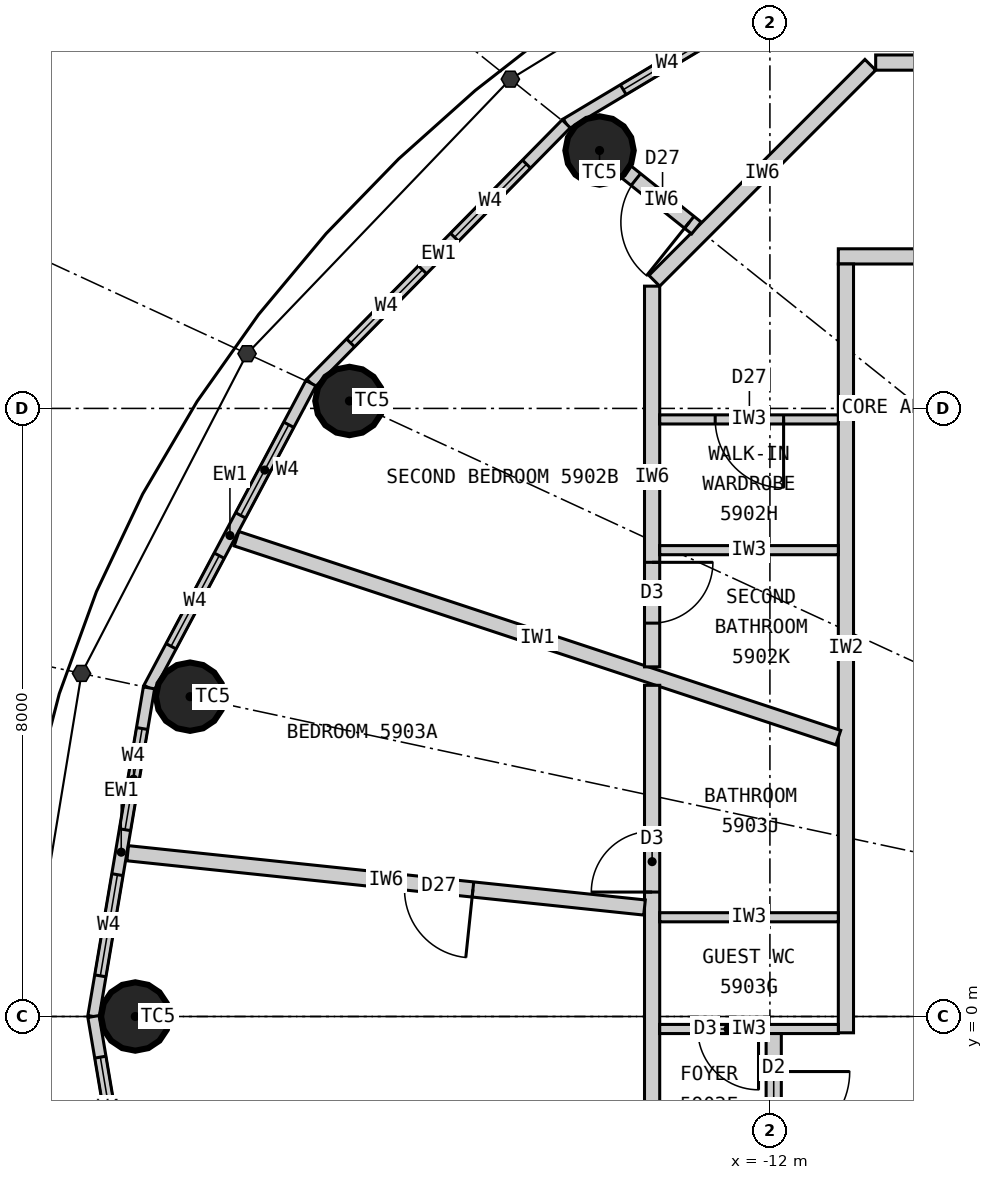
"""IFC4 building model, lengths in metres.
Left out: names, types, materials, properties, quantities, classifications, styles, units other than length and angle.
Written with IfcOpenShell. Run it as: python <this file> out.ifc"""

import sys

from ifc_helpers import new_model, si_unit, direction, frame, frame_2d, origin, origin_2d, place, context, subcontext, project, spatial, rectangle, circle, extrude, element, fill, save


model = new_model("IFC4")
c1 = context("Model", 3, precision=1e-05, world=origin(), true_north=direction((0.0, 1.0)))
c2 = subcontext(c1, "Body", "Model", "MODEL_VIEW")
j1 = project(units=[si_unit("LENGTHUNIT", "METRE"), si_unit("PLANEANGLEUNIT", "RADIAN")], contexts=[c1])
p1 = place(None, origin())
s1 = spatial("IfcSite", under=j1, at=p1, CompositionType="ELEMENT")
p2 = place(p1, origin())
s2 = spatial("IfcBuilding", under=s1, at=p2, CompositionType="ELEMENT")
p3 = place(p2, frame((0.0, 0.0, 219.3)))
s3 = spatial("IfcBuildingStorey", under=s2, at=p3, CompositionType="ELEMENT", Elevation=219.3)
for number, where, z_axis, x_axis in (
    (1, (-14.241, 11.393, 0.0), (0.0, 0.0, 1.0), (1.0, 0.0, 0.0)),
    (2, (-17.532, 8.098, 0.0), (0.0, 0.0, 1.0), (1.0, 0.0, 0.0)),
    (3, (-19.629, 4.208, 0.0), (0.0, 0.0, 1.0), (1.0, 0.0, 0.0)),
    (4, (-20.35, 0.0, 0.0), (0.0, 0.0, 1.0), (1.0, 0.0, 0.0)),
):
    element("IfcColumn", number, at=place(p3, frame(where, z_axis=z_axis, x_axis=x_axis)), inside=s3, PredefinedType="COLUMN", context=c2, shape_type="SweptSolid", body=[
        extrude(circle(Radius=0.45, at=origin_2d()), origin(), (0.0, 0.0, 1.0), 3.3),
    ])
p4 = place(p3, frame((-10.346, 14.336, 0.0), z_axis=(0.0, 0.0, 1.0), x_axis=(-0.85822150553, -0.513279502265, 0.0)))
e5 = element("IfcWall", 5, at=p4, inside=s3, PredefinedType="ELEMENTEDWALL", context=c2, shape_type="SweptSolid", body=[
    extrude(rectangle(XDim=5.05, YDim=0.15, at=frame_2d((2.525, 0.0))), origin(), (0.0, 0.0, 1.0), 3.12),
])
p5 = place(p4, frame((0.875, 0.0, 0.9)))
e6 = element("IfcOpeningElement", 6, at=p5, cuts=e5, PredefinedType="OPENING", context=c2, shape_type="SweptSolid", body=[
    extrude(rectangle(XDim=1.35, YDim=1.9, at=frame_2d((0.675, 0.95))), frame((0.0, 0.085, 0.0), z_axis=(0.0, -1.0, 0.0), x_axis=(1.0, 0.0, 0.0)), (0.0, 0.0, 1.0), 0.17),
])
p6 = place(p4, frame((2.825, 0.0, 0.9)))
e7 = element("IfcOpeningElement", 7, at=p6, cuts=e5, PredefinedType="OPENING", context=c2, shape_type="SweptSolid", body=[
    extrude(rectangle(XDim=1.35, YDim=1.9, at=frame_2d((0.675, 0.95))), frame((0.0, 0.085, 0.0), z_axis=(0.0, -1.0, 0.0), x_axis=(1.0, 0.0, 0.0)), (0.0, 0.0, 1.0), 0.17),
])
p7 = place(p3, frame((-14.68, 11.744, 0.0), z_axis=(0.0, 0.0, 1.0), x_axis=(-0.701527379618, -0.712642501993, 0.0)))
e8 = element("IfcWall", 8, at=p7, inside=s3, PredefinedType="ELEMENTEDWALL", context=c2, shape_type="SweptSolid", body=[
    extrude(rectangle(XDim=4.788, YDim=0.15, at=frame_2d((2.394, 0.0))), origin(), (0.0, 0.0, 1.0), 3.12),
])
p8 = place(p7, frame((0.744, 0.0, 0.9)))
e9 = element("IfcOpeningElement", 9, at=p8, cuts=e8, PredefinedType="OPENING", context=c2, shape_type="SweptSolid", body=[
    extrude(rectangle(XDim=1.35, YDim=1.9, at=frame_2d((0.675, 0.95))), frame((0.0, 0.085, 0.0), z_axis=(0.0, -1.0, 0.0), x_axis=(1.0, 0.0, 0.0)), (0.0, 0.0, 1.0), 0.17),
])
p9 = place(p7, frame((2.694, 0.0, 0.9)))
e10 = element("IfcOpeningElement", 10, at=p9, cuts=e8, PredefinedType="OPENING", context=c2, shape_type="SweptSolid", body=[
    extrude(rectangle(XDim=1.35, YDim=1.9, at=frame_2d((0.675, 0.95))), frame((0.0, 0.085, 0.0), z_axis=(0.0, -1.0, 0.0), x_axis=(1.0, 0.0, 0.0)), (0.0, 0.0, 1.0), 0.17),
])
p10 = place(p3, frame((-18.04, 8.332, 0.0), z_axis=(0.0, 0.0, 1.0), x_axis=(-0.469256152955, -0.883062094597, 0.0)))
e11 = element("IfcWall", 11, at=p10, inside=s3, PredefinedType="ELEMENTEDWALL", context=c2, shape_type="SweptSolid", body=[
    extrude(rectangle(XDim=4.539, YDim=0.15, at=frame_2d((2.27, 0.0))), origin(), (0.0, 0.0, 1.0), 3.12),
])
p11 = place(p10, frame((0.62, 0.0, 0.9)))
e12 = element("IfcOpeningElement", 12, at=p11, cuts=e11, PredefinedType="OPENING", context=c2, shape_type="SweptSolid", body=[
    extrude(rectangle(XDim=1.35, YDim=1.9, at=frame_2d((0.675, 0.95))), frame((0.0, 0.085, 0.0), z_axis=(0.0, -1.0, 0.0), x_axis=(1.0, 0.0, 0.0)), (0.0, 0.0, 1.0), 0.17),
])
p12 = place(p10, frame((2.57, 0.0, 0.9)))
e13 = element("IfcOpeningElement", 13, at=p12, cuts=e11, PredefinedType="OPENING", context=c2, shape_type="SweptSolid", body=[
    extrude(rectangle(XDim=1.35, YDim=1.9, at=frame_2d((0.675, 0.95))), frame((0.0, 0.085, 0.0), z_axis=(0.0, -1.0, 0.0), x_axis=(1.0, 0.0, 0.0)), (0.0, 0.0, 1.0), 0.17),
])
p13 = place(p3, frame((-20.17, 4.323, 0.0), z_axis=(0.0, 0.0, 1.0), x_axis=(-0.166538513568, -0.986034950445, 0.0)))
e14 = element("IfcWall", 14, at=p13, inside=s3, PredefinedType="ELEMENTEDWALL", context=c2, shape_type="SweptSolid", body=[
    extrude(rectangle(XDim=4.385, YDim=0.15, at=frame_2d((2.192, 0.0))), origin(), (0.0, 0.0, 1.0), 3.12),
])
p14 = place(p13, frame((0.542, 0.0, 0.9)))
e15 = element("IfcOpeningElement", 15, at=p14, cuts=e14, PredefinedType="OPENING", context=c2, shape_type="SweptSolid", body=[
    extrude(rectangle(XDim=1.35, YDim=1.9, at=frame_2d((0.675, 0.95))), frame((0.0, 0.085, 0.0), z_axis=(0.0, -1.0, 0.0), x_axis=(1.0, 0.0, 0.0)), (0.0, 0.0, 1.0), 0.17),
])
p15 = place(p13, frame((2.492, 0.0, 0.9)))
e16 = element("IfcOpeningElement", 16, at=p15, cuts=e14, PredefinedType="OPENING", context=c2, shape_type="SweptSolid", body=[
    extrude(rectangle(XDim=1.35, YDim=1.9, at=frame_2d((0.675, 0.95))), frame((0.0, 0.085, 0.0), z_axis=(0.0, -1.0, 0.0), x_axis=(1.0, 0.0, 0.0)), (0.0, 0.0, 1.0), 0.17),
])
p16 = place(p3, frame((-20.9, 0.0, 0.0), z_axis=(0.0, 0.0, 1.0), x_axis=(0.166538513568, -0.986034950445, 0.0)))
e17 = element("IfcWall", 17, at=p16, inside=s3, PredefinedType="ELEMENTEDWALL", context=c2, shape_type="SweptSolid", body=[
    extrude(rectangle(XDim=4.385, YDim=0.15, at=frame_2d((2.192, 0.0))), origin(), (0.0, 0.0, 1.0), 3.12),
])
p17 = place(p16, frame((0.542, 0.0, 0.9)))
e18 = element("IfcOpeningElement", 18, at=p17, cuts=e17, PredefinedType="OPENING", context=c2, shape_type="SweptSolid", body=[
    extrude(rectangle(XDim=1.35, YDim=1.9, at=frame_2d((0.675, 0.95))), frame((0.0, 0.085, 0.0), z_axis=(0.0, -1.0, 0.0), x_axis=(1.0, 0.0, 0.0)), (0.0, 0.0, 1.0), 0.17),
])
p18 = place(p16, frame((2.492, 0.0, 0.9)))
e19 = element("IfcOpeningElement", 19, at=p18, cuts=e17, PredefinedType="OPENING", context=c2, shape_type="SweptSolid", body=[
    extrude(rectangle(XDim=1.35, YDim=1.9, at=frame_2d((0.675, 0.95))), frame((0.0, 0.085, 0.0), z_axis=(0.0, -1.0, 0.0), x_axis=(1.0, 0.0, 0.0)), (0.0, 0.0, 1.0), 0.17),
])
p19 = place(p3, frame((-11.1, 10.0, 0.0), z_axis=(0.0, 0.0, 1.0), x_axis=(1.0, 0.0, 0.0)))
e20 = element("IfcWall", 20, at=p19, inside=s3, PredefinedType="PARTITIONING", context=c2, shape_type="SweptSolid", body=[
    extrude(rectangle(XDim=22.2, YDim=0.2, at=frame_2d((11.1, 0.0))), origin(), (0.0, 0.0, 1.0), 3.12),
])
p20 = place(p19, frame((20.9, 0.0, 0.0)))
e21 = element("IfcOpeningElement", 21, at=p20, cuts=e20, PredefinedType="OPENING", context=c2, shape_type="SweptSolid", body=[
    extrude(rectangle(XDim=1.0, YDim=2.2, at=frame_2d((0.5, 1.1))), frame((0.0, 0.11, 0.0), z_axis=(0.0, -1.0, 0.0), x_axis=(1.0, 0.0, 0.0)), (0.0, 0.0, 1.0), 0.22),
])
p21 = place(p19, frame((2.82, 0.0, 0.0)))
e22 = element("IfcOpeningElement", 22, at=p21, cuts=e20, PredefinedType="OPENING", context=c2, shape_type="SweptSolid", body=[
    extrude(rectangle(XDim=1.0, YDim=2.2, at=frame_2d((0.5, 1.1))), frame((0.0, 0.11, 0.0), z_axis=(0.0, -1.0, 0.0), x_axis=(1.0, 0.0, 0.0)), (0.0, 0.0, 1.0), 0.22),
])
p22 = place(p3, frame((-11.0, 9.9, 0.0), z_axis=(0.0, 0.0, 1.0), x_axis=(0.0, -1.0, 0.0)))
e23 = element("IfcWall", 23, at=p22, inside=s3, PredefinedType="PARTITIONING", context=c2, shape_type="SweptSolid", body=[
    extrude(rectangle(XDim=10.114, YDim=0.2, at=frame_2d((5.057, 0.0))), origin(), (0.0, 0.0, 1.0), 3.12),
])
p23 = place(p3, frame((-11.1, 3.669, 0.0), z_axis=(0.0, 0.0, 1.0), x_axis=(-0.949476668397, 0.313837627079, 0.0)))
e24 = element("IfcWall", 24, at=p23, inside=s3, PredefinedType="PARTITIONING", context=c2, shape_type="SweptSolid", body=[
    extrude(rectangle(XDim=8.339, YDim=0.2, at=frame_2d((4.169, 0.0))), origin(), (0.0, 0.0, 1.0), 3.12),
])
p24 = place(p3, frame((1.968, 12.55, 0.0), z_axis=(0.0, 0.0, 1.0), x_axis=(-1.0, 0.0, 0.0)))
e25 = element("IfcWall", 25, at=p24, inside=s3, PredefinedType="PARTITIONING", context=c2, shape_type="SweptSolid", body=[
    extrude(rectangle(XDim=12.576, YDim=0.2, at=frame_2d((6.288, 0.0))), origin(), (0.0, 0.0, 1.0), 3.12),
])
p25 = place(p24, frame((1.708, 0.0, 0.0)))
e26 = element("IfcOpeningElement", 26, at=p25, cuts=e25, PredefinedType="OPENING", context=c2, shape_type="SweptSolid", body=[
    extrude(rectangle(XDim=0.8, YDim=2.1, at=frame_2d((0.4, 1.05))), frame((0.0, 0.11, 0.0), z_axis=(0.0, -1.0, 0.0), x_axis=(1.0, 0.0, 0.0)), (0.0, 0.0, 1.0), 0.22),
])
p26 = place(p24, frame((6.62, 0.0, 0.0)))
e27 = element("IfcOpeningElement", 27, at=p26, cuts=e25, PredefinedType="OPENING", context=c2, shape_type="SweptSolid", body=[
    extrude(rectangle(XDim=0.9, YDim=2.1, at=frame_2d((0.45, 1.05))), frame((0.0, 0.11, 0.0), z_axis=(0.0, -1.0, 0.0), x_axis=(1.0, 0.0, 0.0)), (0.0, 0.0, 1.0), 0.22),
])
p27 = place(p3, frame((-10.679, 12.521, 0.0), z_axis=(0.0, 0.0, 1.0), x_axis=(-0.707106781187, -0.707106781187, 0.0)))
e28 = element("IfcWall", 28, at=p27, inside=s3, PredefinedType="PARTITIONING", context=c2, shape_type="SweptSolid", body=[
    extrude(rectangle(XDim=4.019, YDim=0.2, at=frame_2d((2.009, 0.0))), origin(), (0.0, 0.0, 1.0), 3.12),
])
p28 = place(p3, frame((-13.55, 9.609, 0.0), z_axis=(0.0, 0.0, 1.0), x_axis=(0.0, -1.0, 0.0)))
e29 = element("IfcWall", 29, at=p28, inside=s3, PredefinedType="PARTITIONING", context=c2, shape_type="SweptSolid", body=[
    extrude(rectangle(XDim=5.009, YDim=0.2, at=frame_2d((2.504, 0.0))), origin(), (0.0, 0.0, 1.0), 3.12),
])
p29 = place(p28, frame((3.633, 0.0, 0.0)))
e30 = element("IfcOpeningElement", 30, at=p29, cuts=e29, PredefinedType="OPENING", context=c2, shape_type="SweptSolid", body=[
    extrude(rectangle(XDim=0.8, YDim=2.1, at=frame_2d((0.4, 1.05))), frame((0.0, 0.11, 0.0), z_axis=(0.0, -1.0, 0.0), x_axis=(1.0, 0.0, 0.0)), (0.0, 0.0, 1.0), 0.22),
])
p30 = place(p3, frame((-12.968, 10.374, 0.0), z_axis=(0.0, 0.0, 1.0), x_axis=(-0.780888968944, 0.624669847345, 0.0)))
e31 = element("IfcWall", 31, at=p30, inside=s3, PredefinedType="PARTITIONING", context=c2, shape_type="SweptSolid", body=[
    extrude(rectangle(XDim=1.181, YDim=0.2, at=frame_2d((0.591, 0.0))), origin(), (0.0, 0.0, 1.0), 2.42),
])
p31 = place(p30, frame((0.12, 0.0, 0.0)))
e32 = element("IfcOpeningElement", 32, at=p31, cuts=e31, PredefinedType="OPENING", context=c2, shape_type="SweptSolid", body=[
    extrude(rectangle(XDim=0.9, YDim=2.1, at=frame_2d((0.45, 1.05))), frame((0.0, 0.11, 0.0), z_axis=(0.0, -1.0, 0.0), x_axis=(1.0, 0.0, 0.0)), (0.0, 0.0, 1.0), 0.22),
])
p32 = place(p3, frame((-11.1, 7.855, 0.0), z_axis=(0.0, 0.0, 1.0), x_axis=(-1.0, 0.0, 0.0)))
e33 = element("IfcWall", 33, at=p32, inside=s3, PredefinedType="PARTITIONING", context=c2, shape_type="SweptSolid", body=[
    extrude(rectangle(XDim=2.35, YDim=0.12, at=frame_2d((1.175, 0.0))), origin(), (0.0, 0.0, 1.0), 3.12),
])
p33 = place(p32, frame((0.72, 0.0, 0.0)))
e34 = element("IfcOpeningElement", 34, at=p33, cuts=e33, PredefinedType="OPENING", context=c2, shape_type="SweptSolid", body=[
    extrude(rectangle(XDim=0.9, YDim=2.1, at=frame_2d((0.45, 1.05))), frame((0.0, 0.07, 0.0), z_axis=(0.0, -1.0, 0.0), x_axis=(1.0, 0.0, 0.0)), (0.0, 0.0, 1.0), 0.14),
])
p34 = place(p3, frame((-11.1, 6.135, 0.0), z_axis=(0.0, 0.0, 1.0), x_axis=(-1.0, 0.0, 0.0)))
e35 = element("IfcWall", 35, at=p34, inside=s3, PredefinedType="PARTITIONING", context=c2, shape_type="SweptSolid", body=[
    extrude(rectangle(XDim=2.35, YDim=0.12, at=frame_2d((1.175, 0.0))), origin(), (0.0, 0.0, 1.0), 3.12),
])
p35 = place(p3, frame((-13.55, 4.357, 0.0), z_axis=(0.0, 0.0, 1.0), x_axis=(0.0, -1.0, 0.0)))
e36 = element("IfcWall", 36, at=p35, inside=s3, PredefinedType="PARTITIONING", context=c2, shape_type="SweptSolid", body=[
    extrude(rectangle(XDim=12.496, YDim=0.2, at=frame_2d((6.248, 0.0))), origin(), (0.0, 0.0, 1.0), 3.12),
])
p36 = place(p35, frame((1.92, 0.0, 0.0)))
e37 = element("IfcOpeningElement", 37, at=p36, cuts=e36, PredefinedType="OPENING", context=c2, shape_type="SweptSolid", body=[
    extrude(rectangle(XDim=0.8, YDim=2.1, at=frame_2d((0.4, 1.05))), frame((0.0, 0.11, 0.0), z_axis=(0.0, -1.0, 0.0), x_axis=(1.0, 0.0, 0.0)), (0.0, 0.0, 1.0), 0.22),
])
p37 = place(p35, frame((9.27, 0.0, 0.0)))
e38 = element("IfcOpeningElement", 38, at=p37, cuts=e36, PredefinedType="OPENING", context=c2, shape_type="SweptSolid", body=[
    extrude(rectangle(XDim=0.8, YDim=2.1, at=frame_2d((0.4, 1.05))), frame((0.0, 0.11, 0.0), z_axis=(0.0, -1.0, 0.0), x_axis=(1.0, 0.0, 0.0)), (0.0, 0.0, 1.0), 0.22),
])
p38 = place(p35, frame((5.557, 0.0, 0.0)))
e39 = element("IfcOpeningElement", 39, at=p38, cuts=e36, PredefinedType="OPENING", context=c2, shape_type="SweptSolid", body=[
    extrude(rectangle(XDim=0.9, YDim=2.1, at=frame_2d((0.45, 1.05))), frame((0.0, 0.11, 0.0), z_axis=(0.0, -1.0, 0.0), x_axis=(1.0, 0.0, 0.0)), (0.0, 0.0, 1.0), 0.22),
])
p39 = place(p3, frame((-13.65, 1.434, 0.0), z_axis=(0.0, 0.0, 1.0), x_axis=(-0.994526954268, 0.10448031984, 0.0)))
e40 = element("IfcWall", 40, at=p39, inside=s3, PredefinedType="PARTITIONING", context=c2, shape_type="SweptSolid", body=[
    extrude(rectangle(XDim=6.837, YDim=0.2, at=frame_2d((3.418, 0.0))), origin(), (0.0, 0.0, 1.0), 2.47),
])
p40 = place(p39, frame((2.27, 0.0, 0.0)))
e41 = element("IfcOpeningElement", 41, at=p40, cuts=e40, PredefinedType="OPENING", context=c2, shape_type="SweptSolid", body=[
    extrude(rectangle(XDim=0.9, YDim=2.1, at=frame_2d((0.45, 1.05))), frame((0.0, 0.11, 0.0), z_axis=(0.0, -1.0, 0.0), x_axis=(1.0, 0.0, 0.0)), (0.0, 0.0, 1.0), 0.22),
])
p41 = place(p3, frame((-11.1, 1.306, 0.0), z_axis=(0.0, 0.0, 1.0), x_axis=(-1.0, 0.0, 0.0)))
e42 = element("IfcWall", 42, at=p41, inside=s3, PredefinedType="PARTITIONING", context=c2, shape_type="SweptSolid", body=[
    extrude(rectangle(XDim=2.35, YDim=0.12, at=frame_2d((1.175, 0.0))), origin(), (0.0, 0.0, 1.0), 3.12),
])
p42 = place(p3, frame((-11.1, -0.164, 0.0), z_axis=(0.0, 0.0, 1.0), x_axis=(-1.0, 0.0, 0.0)))
e43 = element("IfcWall", 43, at=p42, inside=s3, PredefinedType="PARTITIONING", context=c2, shape_type="SweptSolid", body=[
    extrude(rectangle(XDim=2.35, YDim=0.12, at=frame_2d((1.175, 0.0))), origin(), (0.0, 0.0, 1.0), 3.12),
])
p43 = place(p42, frame((1.05, 0.0, 0.0)))
e44 = element("IfcOpeningElement", 44, at=p43, cuts=e43, PredefinedType="OPENING", context=c2, shape_type="SweptSolid", body=[
    extrude(rectangle(XDim=0.8, YDim=2.1, at=frame_2d((0.4, 1.05))), frame((0.0, 0.07, 0.0), z_axis=(0.0, -1.0, 0.0), x_axis=(1.0, 0.0, 0.0)), (0.0, 0.0, 1.0), 0.14),
])
p44 = place(p3, frame((-11.95, -0.224, 0.0), z_axis=(0.0, 0.0, 1.0), x_axis=(0.0, -1.0, 0.0)))
e45 = element("IfcWall", 45, at=p44, inside=s3, PredefinedType="PARTITIONING", context=c2, shape_type="SweptSolid", body=[
    extrude(rectangle(XDim=2.0, YDim=0.2, at=frame_2d((1.0, 0.0))), origin(), (0.0, 0.0, 1.0), 3.12),
])
p45 = place(p44, frame((0.5, 0.0, 0.0)))
e46 = element("IfcOpeningElement", 46, at=p45, cuts=e45, PredefinedType="OPENING", context=c2, shape_type="SweptSolid", body=[
    extrude(rectangle(XDim=1.0, YDim=2.2, at=frame_2d((0.5, 1.1))), frame((0.0, 0.11, 0.0), z_axis=(0.0, -1.0, 0.0), x_axis=(1.0, 0.0, 0.0)), (0.0, 0.0, 1.0), 0.22),
])
p46 = place(p6, origin())
e47 = element("IfcWindow", 47, at=p46, inside=s3, PartitioningType="SINGLE_PANEL", PredefinedType="WINDOW", context=c2, shape_type="SweptSolid", body=[
    extrude(rectangle(XDim=1.35, YDim=1.9, at=frame_2d((0.675, 0.95))), frame((0.0, 0.03, 0.0), z_axis=(0.0, -1.0, 0.0), x_axis=(1.0, 0.0, 0.0)), (0.0, 0.0, 1.0), 0.06),
])
fill(e7, e47)
p47 = place(p8, origin())
e48 = element("IfcWindow", 48, at=p47, inside=s3, PartitioningType="SINGLE_PANEL", PredefinedType="WINDOW", context=c2, shape_type="SweptSolid", body=[
    extrude(rectangle(XDim=1.35, YDim=1.9, at=frame_2d((0.675, 0.95))), frame((0.0, 0.03, 0.0), z_axis=(0.0, -1.0, 0.0), x_axis=(1.0, 0.0, 0.0)), (0.0, 0.0, 1.0), 0.06),
])
fill(e9, e48)
p48 = place(p9, origin())
e49 = element("IfcWindow", 49, at=p48, inside=s3, PartitioningType="SINGLE_PANEL", PredefinedType="WINDOW", context=c2, shape_type="SweptSolid", body=[
    extrude(rectangle(XDim=1.35, YDim=1.9, at=frame_2d((0.675, 0.95))), frame((0.0, 0.03, 0.0), z_axis=(0.0, -1.0, 0.0), x_axis=(1.0, 0.0, 0.0)), (0.0, 0.0, 1.0), 0.06),
])
fill(e10, e49)
p49 = place(p11, origin())
e50 = element("IfcWindow", 50, at=p49, inside=s3, PartitioningType="SINGLE_PANEL", PredefinedType="WINDOW", context=c2, shape_type="SweptSolid", body=[
    extrude(rectangle(XDim=1.35, YDim=1.9, at=frame_2d((0.675, 0.95))), frame((0.0, 0.03, 0.0), z_axis=(0.0, -1.0, 0.0), x_axis=(1.0, 0.0, 0.0)), (0.0, 0.0, 1.0), 0.06),
])
fill(e12, e50)
p50 = place(p12, origin())
e51 = element("IfcWindow", 51, at=p50, inside=s3, PartitioningType="SINGLE_PANEL", PredefinedType="WINDOW", context=c2, shape_type="SweptSolid", body=[
    extrude(rectangle(XDim=1.35, YDim=1.9, at=frame_2d((0.675, 0.95))), frame((0.0, 0.03, 0.0), z_axis=(0.0, -1.0, 0.0), x_axis=(1.0, 0.0, 0.0)), (0.0, 0.0, 1.0), 0.06),
])
fill(e13, e51)
p51 = place(p14, origin())
e52 = element("IfcWindow", 52, at=p51, inside=s3, PartitioningType="SINGLE_PANEL", PredefinedType="WINDOW", context=c2, shape_type="SweptSolid", body=[
    extrude(rectangle(XDim=1.35, YDim=1.9, at=frame_2d((0.675, 0.95))), frame((0.0, 0.03, 0.0), z_axis=(0.0, -1.0, 0.0), x_axis=(1.0, 0.0, 0.0)), (0.0, 0.0, 1.0), 0.06),
])
fill(e15, e52)
p52 = place(p15, origin())
e53 = element("IfcWindow", 53, at=p52, inside=s3, PartitioningType="SINGLE_PANEL", PredefinedType="WINDOW", context=c2, shape_type="SweptSolid", body=[
    extrude(rectangle(XDim=1.35, YDim=1.9, at=frame_2d((0.675, 0.95))), frame((0.0, 0.03, 0.0), z_axis=(0.0, -1.0, 0.0), x_axis=(1.0, 0.0, 0.0)), (0.0, 0.0, 1.0), 0.06),
])
fill(e16, e53)
p53 = place(p17, origin())
e54 = element("IfcWindow", 54, at=p53, inside=s3, PartitioningType="SINGLE_PANEL", PredefinedType="WINDOW", context=c2, shape_type="SweptSolid", body=[
    extrude(rectangle(XDim=1.35, YDim=1.9, at=frame_2d((0.675, 0.95))), frame((0.0, 0.03, 0.0), z_axis=(0.0, -1.0, 0.0), x_axis=(1.0, 0.0, 0.0)), (0.0, 0.0, 1.0), 0.06),
])
fill(e18, e54)
p54 = place(p33, origin())
e55 = element("IfcDoor", 55, at=p54, inside=s3, OperationType="SINGLE_SWING_LEFT", PredefinedType="DOOR", context=c2, shape_type="SweptSolid", body=[
    extrude(rectangle(XDim=0.9, YDim=2.1, at=frame_2d((0.45, 1.05))), frame((0.0, 0.025, 0.0), z_axis=(0.0, -1.0, 0.0), x_axis=(1.0, 0.0, 0.0)), (0.0, 0.0, 1.0), 0.05),
])
fill(e34, e55)
p55 = place(p29, origin())
e56 = element("IfcDoor", 56, at=p55, inside=s3, OperationType="SINGLE_SWING_LEFT", PredefinedType="DOOR", context=c2, shape_type="SweptSolid", body=[
    extrude(rectangle(XDim=0.8, YDim=2.1, at=frame_2d((0.4, 1.05))), frame((0.0, 0.025, 0.0), z_axis=(0.0, -1.0, 0.0), x_axis=(1.0, 0.0, 0.0)), (0.0, 0.0, 1.0), 0.05),
])
fill(e30, e56)
p56 = place(p31, origin())
e57 = element("IfcDoor", 57, at=p56, inside=s3, OperationType="SINGLE_SWING_LEFT", PredefinedType="DOOR", context=c2, shape_type="SweptSolid", body=[
    extrude(rectangle(XDim=0.9, YDim=2.1, at=frame_2d((0.45, 1.05))), frame((0.0, 0.025, 0.0), z_axis=(0.0, -1.0, 0.0), x_axis=(1.0, 0.0, 0.0)), (0.0, 0.0, 1.0), 0.05),
])
fill(e32, e57)
p57 = place(p45, origin())
e58 = element("IfcDoor", 58, at=p57, inside=s3, OperationType="SINGLE_SWING_LEFT", PredefinedType="DOOR", context=c2, shape_type="SweptSolid", body=[
    extrude(rectangle(XDim=1.0, YDim=2.2, at=frame_2d((0.5, 1.1))), frame((0.0, 0.025, 0.0), z_axis=(0.0, -1.0, 0.0), x_axis=(1.0, 0.0, 0.0)), (0.0, 0.0, 1.0), 0.05),
])
fill(e46, e58)
p58 = place(p36, origin())
e59 = element("IfcDoor", 59, at=p58, inside=s3, OperationType="SINGLE_SWING_RIGHT", PredefinedType="DOOR", context=c2, shape_type="SweptSolid", body=[
    extrude(rectangle(XDim=0.8, YDim=2.1, at=frame_2d((0.4, 1.05))), frame((0.0, 0.025, 0.0), z_axis=(0.0, -1.0, 0.0), x_axis=(1.0, 0.0, 0.0)), (0.0, 0.0, 1.0), 0.05),
])
fill(e37, e59)
p59 = place(p43, origin())
e60 = element("IfcDoor", 60, at=p59, inside=s3, OperationType="SINGLE_SWING_LEFT", PredefinedType="DOOR", context=c2, shape_type="SweptSolid", body=[
    extrude(rectangle(XDim=0.8, YDim=2.1, at=frame_2d((0.4, 1.05))), frame((0.0, 0.025, 0.0), z_axis=(0.0, -1.0, 0.0), x_axis=(1.0, 0.0, 0.0)), (0.0, 0.0, 1.0), 0.05),
])
fill(e44, e60)
p60 = place(p40, origin())
e61 = element("IfcDoor", 61, at=p60, inside=s3, OperationType="SINGLE_SWING_LEFT", PredefinedType="DOOR", context=c2, shape_type="SweptSolid", body=[
    extrude(rectangle(XDim=0.9, YDim=2.1, at=frame_2d((0.45, 1.05))), frame((0.0, 0.025, 0.0), z_axis=(0.0, -1.0, 0.0), x_axis=(1.0, 0.0, 0.0)), (0.0, 0.0, 1.0), 0.05),
])
fill(e41, e61)
save(model, sys.argv[1])
